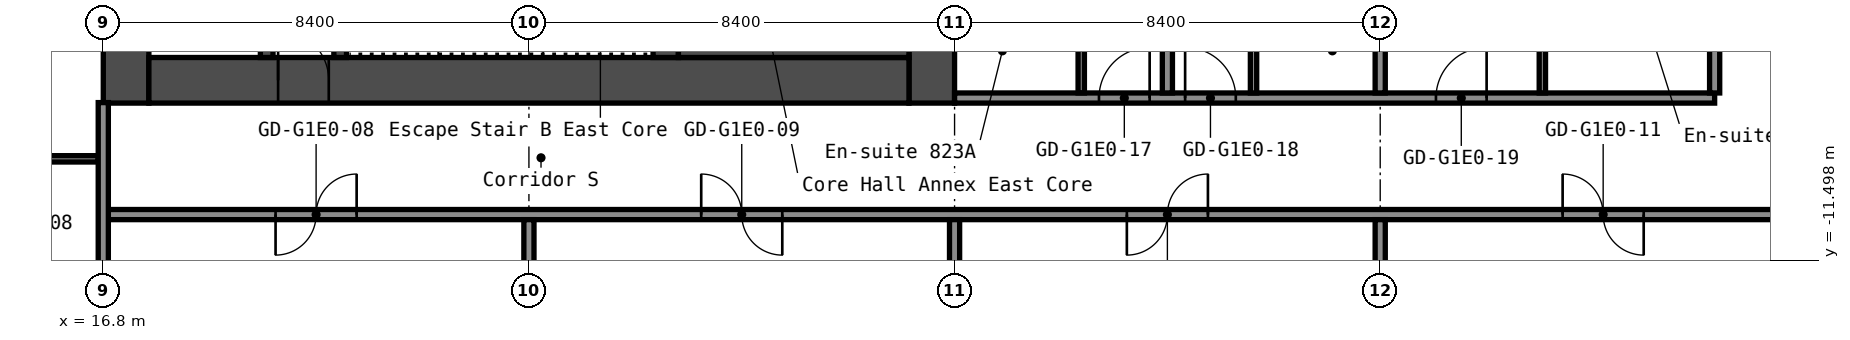
"""IFC4 building model, lengths in metres.
Left out: names, types, materials, properties, quantities, classifications, styles, units other than length and angle.
Written with IfcOpenShell. Run it as: python <this file> out.ifc"""

import sys

from ifc_helpers import new_model, si_unit, direction, frame, frame_2d, origin, place, context, subcontext, project, spatial, rectangle, extrude, element, fill, save


model = new_model("IFC4")
c1 = context("Model", 3, precision=1e-05, world=origin(), true_north=direction((0.0, 1.0)))
c2 = subcontext(c1, "Body", "Model", "MODEL_VIEW")
j1 = project(units=[si_unit("LENGTHUNIT", "METRE"), si_unit("PLANEANGLEUNIT", "RADIAN")], contexts=[c1])
p1 = place(None, origin())
s1 = spatial("IfcSite", under=j1, at=p1, CompositionType="ELEMENT")
p2 = place(p1, origin())
s2 = spatial("IfcBuilding", under=s1, at=p2, CompositionType="ELEMENT")
p3 = place(p2, frame((0.0, 0.0, 32.6)))
s3 = spatial("IfcBuildingStorey", under=s2, at=p3, CompositionType="ELEMENT", Elevation=32.6)
p4 = place(p3, frame((17.25, -8.4, 0.0), z_axis=(0.0, 0.0, 1.0), x_axis=(0.0, 1.0, 0.0)))
e1 = element("IfcWall", 1, at=p4, inside=s3, PredefinedType="SHEAR", context=c2, shape_type="SweptSolid", body=[
    extrude(rectangle(XDim=16.8, YDim=0.9, at=frame_2d((8.4, 0.0))), origin(), (0.0, 0.0, 1.0), 2.8),
])
p5 = place(p4, frame((12.75, 0.0, 0.0)))
e2 = element("IfcOpeningElement", 2, at=p5, cuts=e1, PredefinedType="OPENING", context=c2, shape_type="SweptSolid", body=[
    extrude(rectangle(XDim=1.2, YDim=2.1, at=frame_2d((0.6, 1.05))), frame((0.0, 0.46, 0.0), z_axis=(0.0, -1.0, 0.0), x_axis=(1.0, 0.0, 0.0)), (0.0, 0.0, 1.0), 0.92),
])
p6 = place(p4, frame((2.85, 0.0, 0.0)))
e3 = element("IfcOpeningElement", 3, at=p6, cuts=e1, PredefinedType="OPENING", context=c2, shape_type="SweptSolid", body=[
    extrude(rectangle(XDim=1.2, YDim=2.1, at=frame_2d((0.6, 1.05))), frame((0.0, 0.46, 0.0), z_axis=(0.0, -1.0, 0.0), x_axis=(1.0, 0.0, 0.0)), (0.0, 0.0, 1.0), 0.92),
])
p7 = place(p3, frame((33.15, -8.4, 0.0), z_axis=(0.0, 0.0, 1.0), x_axis=(0.0, 1.0, 0.0)))
e4 = element("IfcWall", 4, at=p7, inside=s3, PredefinedType="SHEAR", context=c2, shape_type="SweptSolid", body=[
    extrude(rectangle(XDim=16.8, YDim=0.9, at=frame_2d((8.4, 0.0))), origin(), (0.0, 0.0, 1.0), 2.8),
])
p8 = place(p3, frame((17.7, -7.95, 0.0), z_axis=(0.0, 0.0, 1.0), x_axis=(1.0, 0.0, 0.0)))
e5 = element("IfcWall", 5, at=p8, inside=s3, PredefinedType="SHEAR", context=c2, shape_type="SweptSolid", body=[
    extrude(rectangle(XDim=15.0, YDim=0.9, at=frame_2d((7.5, 0.0))), origin(), (0.0, 0.0, 1.0), 2.8),
])
p9 = place(p8, frame((2.55, 0.0, 0.0)))
e6 = element("IfcOpeningElement", 6, at=p9, cuts=e5, PredefinedType="OPENING", context=c2, shape_type="SweptSolid", body=[
    extrude(rectangle(XDim=1.0, YDim=2.1, at=frame_2d((0.5, 1.05))), frame((0.0, 0.46, 0.0), z_axis=(0.0, -1.0, 0.0), x_axis=(1.0, 0.0, 0.0)), (0.0, 0.0, 1.0), 0.92),
])
p10 = place(p3, frame((20.025, -7.5, 0.0), z_axis=(0.0, 0.0, 1.0), x_axis=(0.0, 1.0, 0.0)))
e7 = element("IfcWall", 7, at=p10, inside=s3, PredefinedType="SHEAR", context=c2, shape_type="SweptSolid", body=[
    extrude(rectangle(XDim=6.3, YDim=0.25, at=frame_2d((3.15, 0.0))), origin(), (0.0, 0.0, 1.0), 2.8),
])
p11 = place(p10, frame((2.4, 0.0, 0.0)))
e8 = element("IfcOpeningElement", 8, at=p11, cuts=e7, PredefinedType="OPENING", context=c2, shape_type="SweptSolid", body=[
    extrude(rectangle(XDim=1.0, YDim=2.1, at=frame_2d((0.5, 1.05))), frame((0.0, 0.135, 0.0), z_axis=(0.0, -1.0, 0.0), x_axis=(1.0, 0.0, 0.0)), (0.0, 0.0, 1.0), 0.27),
])
p12 = place(p3, frame((21.475, -7.5, 0.0), z_axis=(0.0, 0.0, 1.0), x_axis=(0.0, 1.0, 0.0)))
e9 = element("IfcWall", 9, at=p12, inside=s3, PredefinedType="SHEAR", context=c2, shape_type="SweptSolid", body=[
    extrude(rectangle(XDim=3.75, YDim=0.25, at=frame_2d((1.875, 0.0))), origin(), (0.0, 0.0, 1.0), 2.8),
])
p13 = place(p12, frame((1.3, 0.0, 0.0)))
e10 = element("IfcOpeningElement", 10, at=p13, cuts=e9, PredefinedType="OPENING", context=c2, shape_type="SweptSolid", body=[
    extrude(rectangle(XDim=1.2, YDim=2.1, at=frame_2d((0.6, 1.05))), frame((0.0, 0.135, 0.0), z_axis=(0.0, -1.0, 0.0), x_axis=(1.0, 0.0, 0.0)), (0.0, 0.0, 1.0), 0.27),
])
p14 = place(p3, frame((27.9, -7.5, 0.0), z_axis=(0.0, 0.0, 1.0), x_axis=(0.0, 1.0, 0.0)))
e11 = element("IfcWall", 11, at=p14, inside=s3, PredefinedType="SHEAR", context=c2, shape_type="SweptSolid", body=[
    extrude(rectangle(XDim=3.75, YDim=0.5, at=frame_2d((1.875, 0.0))), origin(), (0.0, 0.0, 1.0), 2.8),
])
p15 = place(p3, frame((28.15, -6.75, 0.0), z_axis=(0.0, 0.0, 1.0), x_axis=(1.0, 0.0, 0.0)))
e12 = element("IfcWall", 12, at=p15, inside=s3, PredefinedType="SHEAR", context=c2, shape_type="SweptSolid", body=[
    extrude(rectangle(XDim=4.55, YDim=1.5, at=frame_2d((2.275, 0.0))), origin(), (0.0, 0.0, 1.0), 2.8),
])
p16 = place(p3, frame((16.8, -10.6, 0.0), z_axis=(0.0, 0.0, 1.0), x_axis=(1.0, 0.0, 0.0)))
e13 = element("IfcWall", 13, at=p16, inside=s3, PredefinedType="PARTITIONING", context=c2, shape_type="SweptSolid", body=[
    extrude(rectangle(XDim=34.3, YDim=0.2, at=frame_2d((17.15, 0.0))), origin(), (0.0, 0.0, 1.0), 2.8),
])
p17 = place(p16, frame((3.4, 0.0, 0.0)))
e14 = element("IfcOpeningElement", 14, at=p17, cuts=e13, PredefinedType="OPENING", context=c2, shape_type="SweptSolid", body=[
    extrude(rectangle(XDim=1.6, YDim=2.1, at=frame_2d((0.8, 1.05))), frame((0.0, 0.11, 0.0), z_axis=(0.0, -1.0, 0.0), x_axis=(1.0, 0.0, 0.0)), (0.0, 0.0, 1.0), 0.22),
])
p18 = place(p16, frame((11.8, 0.0, 0.0)))
e15 = element("IfcOpeningElement", 15, at=p18, cuts=e13, PredefinedType="OPENING", context=c2, shape_type="SweptSolid", body=[
    extrude(rectangle(XDim=1.6, YDim=2.1, at=frame_2d((0.8, 1.05))), frame((0.0, 0.11, 0.0), z_axis=(0.0, -1.0, 0.0), x_axis=(1.0, 0.0, 0.0)), (0.0, 0.0, 1.0), 0.22),
])
p19 = place(p16, frame((20.2, 0.0, 0.0)))
e16 = element("IfcOpeningElement", 16, at=p19, cuts=e13, PredefinedType="OPENING", context=c2, shape_type="SweptSolid", body=[
    extrude(rectangle(XDim=1.6, YDim=2.1, at=frame_2d((0.8, 1.05))), frame((0.0, 0.11, 0.0), z_axis=(0.0, -1.0, 0.0), x_axis=(1.0, 0.0, 0.0)), (0.0, 0.0, 1.0), 0.22),
])
p20 = place(p16, frame((28.8, 0.0, 0.0)))
e17 = element("IfcOpeningElement", 17, at=p20, cuts=e13, PredefinedType="OPENING", context=c2, shape_type="SweptSolid", body=[
    extrude(rectangle(XDim=1.6, YDim=2.1, at=frame_2d((0.8, 1.05))), frame((0.0, 0.11, 0.0), z_axis=(0.0, -1.0, 0.0), x_axis=(1.0, 0.0, 0.0)), (0.0, 0.0, 1.0), 0.22),
])
p21 = place(p3, frame((13.262, -9.5, 0.0), z_axis=(0.0, 0.0, 1.0), x_axis=(1.0, 0.0, 0.0)))
e18 = element("IfcWall", 18, at=p21, inside=s3, PredefinedType="PARTITIONING", context=c2, shape_type="SweptSolid", body=[
    extrude(rectangle(XDim=3.438, YDim=0.125, at=frame_2d((1.719, 0.0))), origin(), (0.0, 0.0, 1.0), 2.8),
])
p22 = place(p3, frame((33.6, -8.3, 0.0), z_axis=(0.0, 0.0, 1.0), x_axis=(1.0, 0.0, 0.0)))
e19 = element("IfcWall", 19, at=p22, inside=s3, PredefinedType="PARTITIONING", context=c2, shape_type="SweptSolid", body=[
    extrude(rectangle(XDim=15.0, YDim=0.2, at=frame_2d((7.5, 0.0))), origin(), (0.0, 0.0, 1.0), 2.8),
])
p23 = place(p22, frame((2.85, 0.0, 0.0)))
e20 = element("IfcOpeningElement", 20, at=p23, cuts=e19, PredefinedType="OPENING", context=c2, shape_type="SweptSolid", body=[
    extrude(rectangle(XDim=1.0, YDim=2.1, at=frame_2d((0.5, 1.05))), frame((0.0, 0.11, 0.0), z_axis=(0.0, -1.0, 0.0), x_axis=(1.0, 0.0, 0.0)), (0.0, 0.0, 1.0), 0.22),
])
p24 = place(p22, frame((4.55, 0.0, 0.0)))
e21 = element("IfcOpeningElement", 21, at=p24, cuts=e19, PredefinedType="OPENING", context=c2, shape_type="SweptSolid", body=[
    extrude(rectangle(XDim=1.0, YDim=2.1, at=frame_2d((0.5, 1.05))), frame((0.0, 0.11, 0.0), z_axis=(0.0, -1.0, 0.0), x_axis=(1.0, 0.0, 0.0)), (0.0, 0.0, 1.0), 0.22),
])
p25 = place(p22, frame((9.5, 0.0, 0.0)))
e22 = element("IfcOpeningElement", 22, at=p25, cuts=e19, PredefinedType="OPENING", context=c2, shape_type="SweptSolid", body=[
    extrude(rectangle(XDim=1.0, YDim=2.1, at=frame_2d((0.5, 1.05))), frame((0.0, 0.11, 0.0), z_axis=(0.0, -1.0, 0.0), x_axis=(1.0, 0.0, 0.0)), (0.0, 0.0, 1.0), 0.22),
])
p26 = place(p3, frame((16.8, -20.3, 0.0), z_axis=(0.0, 0.0, 1.0), x_axis=(0.0, 1.0, 0.0)))
e23 = element("IfcWall", 23, at=p26, inside=s3, PredefinedType="PARTITIONING", context=c2, shape_type="SweptSolid", body=[
    extrude(rectangle(XDim=11.91, YDim=0.2, at=frame_2d((5.955, 0.0))), origin(), (0.0, 0.0, 1.0), 2.8),
])
for number, where, z_axis, x_axis in (
    (24, (25.2, -20.3, 0.0), (0.0, 0.0, 1.0), (0.0, 1.0, 0.0)),
    (25, (33.6, -20.3, 0.0), (0.0, 0.0, 1.0), (0.0, 1.0, 0.0)),
):
    element("IfcWall", number, at=place(p3, frame(where, z_axis=z_axis, x_axis=x_axis)), inside=s3, PredefinedType="PARTITIONING", context=c2, shape_type="SweptSolid", body=[
        extrude(rectangle(XDim=9.6, YDim=0.2, at=frame_2d((4.8, 0.0))), origin(), (0.0, 0.0, 1.0), 2.8),
    ])
p27 = place(p3, frame((36.1, -8.2, 0.0), z_axis=(0.0, 0.0, 1.0), x_axis=(0.0, 1.0, 0.0)))
e26 = element("IfcWall", 26, at=p27, inside=s3, PredefinedType="PARTITIONING", context=c2, shape_type="SweptSolid", body=[
    extrude(rectangle(XDim=2.9, YDim=0.125, at=frame_2d((1.45, 0.0))), origin(), (0.0, 0.0, 1.0), 2.8),
])
p28 = place(p27, frame((1.5, 0.0, 0.0)))
e27 = element("IfcOpeningElement", 27, at=p28, cuts=e26, PredefinedType="OPENING", context=c2, shape_type="SweptSolid", body=[
    extrude(rectangle(XDim=0.8, YDim=2.1, at=frame_2d((0.4, 1.05))), frame((0.0, 0.073, 0.0), z_axis=(0.0, -1.0, 0.0), x_axis=(1.0, 0.0, 0.0)), (0.0, 0.0, 1.0), 0.145),
])
p29 = place(p3, frame((37.8, -8.2, 0.0), z_axis=(0.0, 0.0, 1.0), x_axis=(0.0, 1.0, 0.0)))
e28 = element("IfcWall", 28, at=p29, inside=s3, PredefinedType="PARTITIONING", context=c2, shape_type="SweptSolid", body=[
    extrude(rectangle(XDim=16.4, YDim=0.2, at=frame_2d((8.2, 0.0))), origin(), (0.0, 0.0, 1.0), 2.8),
])
p30 = place(p3, frame((39.5, -8.2, 0.0), z_axis=(0.0, 0.0, 1.0), x_axis=(0.0, 1.0, 0.0)))
e29 = element("IfcWall", 29, at=p30, inside=s3, PredefinedType="PARTITIONING", context=c2, shape_type="SweptSolid", body=[
    extrude(rectangle(XDim=2.9, YDim=0.125, at=frame_2d((1.45, 0.0))), origin(), (0.0, 0.0, 1.0), 2.8),
])
p31 = place(p30, frame((1.5, 0.0, 0.0)))
e30 = element("IfcOpeningElement", 30, at=p31, cuts=e29, PredefinedType="OPENING", context=c2, shape_type="SweptSolid", body=[
    extrude(rectangle(XDim=0.8, YDim=2.1, at=frame_2d((0.4, 1.05))), frame((0.0, 0.073, 0.0), z_axis=(0.0, -1.0, 0.0), x_axis=(1.0, 0.0, 0.0)), (0.0, 0.0, 1.0), 0.145),
])
p32 = place(p3, frame((42.0, -20.3, 0.0), z_axis=(0.0, 0.0, 1.0), x_axis=(0.0, 1.0, 0.0)))
e31 = element("IfcWall", 31, at=p32, inside=s3, PredefinedType="PARTITIONING", context=c2, shape_type="SweptSolid", body=[
    extrude(rectangle(XDim=9.6, YDim=0.2, at=frame_2d((4.8, 0.0))), origin(), (0.0, 0.0, 1.0), 2.8),
])
p33 = place(p3, frame((42.0, -8.2, 0.0), z_axis=(0.0, 0.0, 1.0), x_axis=(0.0, 1.0, 0.0)))
e32 = element("IfcWall", 32, at=p33, inside=s3, PredefinedType="PARTITIONING", context=c2, shape_type="SweptSolid", body=[
    extrude(rectangle(XDim=16.4, YDim=0.2, at=frame_2d((8.2, 0.0))), origin(), (0.0, 0.0, 1.0), 2.8),
])
p34 = place(p3, frame((45.2, -8.2, 0.0), z_axis=(0.0, 0.0, 1.0), x_axis=(0.0, 1.0, 0.0)))
e33 = element("IfcWall", 33, at=p34, inside=s3, PredefinedType="PARTITIONING", context=c2, shape_type="SweptSolid", body=[
    extrude(rectangle(XDim=3.3, YDim=0.125, at=frame_2d((1.65, 0.0))), origin(), (0.0, 0.0, 1.0), 2.8),
])
p35 = place(p3, frame((48.6, -8.2, 0.0), z_axis=(0.0, 0.0, 1.0), x_axis=(0.0, 1.0, 0.0)))
e34 = element("IfcWall", 34, at=p35, inside=s3, PredefinedType="PARTITIONING", context=c2, shape_type="SweptSolid", body=[
    extrude(rectangle(XDim=16.4, YDim=0.2, at=frame_2d((8.2, 0.0))), origin(), (0.0, 0.0, 1.0), 2.8),
])
p36 = place(p9, origin())
e35 = element("IfcDoor", 35, at=p36, inside=s3, OperationType="SINGLE_SWING_RIGHT", PredefinedType="DOOR", context=c2, shape_type="SweptSolid", body=[
    extrude(rectangle(XDim=1.0, YDim=2.1, at=frame_2d((0.5, 1.05))), frame((0.0, 0.025, 0.0), z_axis=(0.0, -1.0, 0.0), x_axis=(1.0, 0.0, 0.0)), (0.0, 0.0, 1.0), 0.05),
])
fill(e6, e35)
p37 = place(p17, origin())
e36 = element("IfcDoor", 36, at=p37, inside=s3, OperationType="DOUBLE_DOOR_SINGLE_SWING", PredefinedType="DOOR", context=c2, shape_type="SweptSolid", body=[
    extrude(rectangle(XDim=1.6, YDim=2.1, at=frame_2d((0.8, 1.05))), frame((0.0, 0.025, 0.0), z_axis=(0.0, -1.0, 0.0), x_axis=(1.0, 0.0, 0.0)), (0.0, 0.0, 1.0), 0.05),
])
fill(e14, e36)
p38 = place(p18, origin())
e37 = element("IfcDoor", 37, at=p38, inside=s3, OperationType="DOUBLE_DOOR_SINGLE_SWING", PredefinedType="DOOR", context=c2, shape_type="SweptSolid", body=[
    extrude(rectangle(XDim=1.6, YDim=2.1, at=frame_2d((0.8, 1.05))), frame((0.0, 0.025, 0.0), z_axis=(0.0, -1.0, 0.0), x_axis=(1.0, 0.0, 0.0)), (0.0, 0.0, 1.0), 0.05),
])
fill(e15, e37)
p39 = place(p19, origin())
e38 = element("IfcDoor", 38, at=p39, inside=s3, OperationType="DOUBLE_DOOR_SINGLE_SWING", PredefinedType="DOOR", context=c2, shape_type="SweptSolid", body=[
    extrude(rectangle(XDim=1.6, YDim=2.1, at=frame_2d((0.8, 1.05))), frame((0.0, 0.025, 0.0), z_axis=(0.0, -1.0, 0.0), x_axis=(1.0, 0.0, 0.0)), (0.0, 0.0, 1.0), 0.05),
])
fill(e16, e38)
p40 = place(p20, origin())
e39 = element("IfcDoor", 39, at=p40, inside=s3, OperationType="DOUBLE_DOOR_SINGLE_SWING", PredefinedType="DOOR", context=c2, shape_type="SweptSolid", body=[
    extrude(rectangle(XDim=1.6, YDim=2.1, at=frame_2d((0.8, 1.05))), frame((0.0, 0.025, 0.0), z_axis=(0.0, -1.0, 0.0), x_axis=(1.0, 0.0, 0.0)), (0.0, 0.0, 1.0), 0.05),
])
fill(e17, e39)
p41 = place(p23, origin())
e40 = element("IfcDoor", 40, at=p41, inside=s3, OperationType="SINGLE_SWING_LEFT", PredefinedType="DOOR", context=c2, shape_type="SweptSolid", body=[
    extrude(rectangle(XDim=1.0, YDim=2.1, at=frame_2d((0.5, 1.05))), frame((0.0, 0.025, 0.0), z_axis=(0.0, -1.0, 0.0), x_axis=(1.0, 0.0, 0.0)), (0.0, 0.0, 1.0), 0.05),
])
fill(e20, e40)
p42 = place(p24, origin())
e41 = element("IfcDoor", 41, at=p42, inside=s3, OperationType="SINGLE_SWING_RIGHT", PredefinedType="DOOR", context=c2, shape_type="SweptSolid", body=[
    extrude(rectangle(XDim=1.0, YDim=2.1, at=frame_2d((0.5, 1.05))), frame((0.0, 0.025, 0.0), z_axis=(0.0, -1.0, 0.0), x_axis=(1.0, 0.0, 0.0)), (0.0, 0.0, 1.0), 0.05),
])
fill(e21, e41)
p43 = place(p25, origin())
e42 = element("IfcDoor", 42, at=p43, inside=s3, OperationType="SINGLE_SWING_LEFT", PredefinedType="DOOR", context=c2, shape_type="SweptSolid", body=[
    extrude(rectangle(XDim=1.0, YDim=2.1, at=frame_2d((0.5, 1.05))), frame((0.0, 0.025, 0.0), z_axis=(0.0, -1.0, 0.0), x_axis=(1.0, 0.0, 0.0)), (0.0, 0.0, 1.0), 0.05),
])
fill(e22, e42)
save(model, sys.argv[1])
